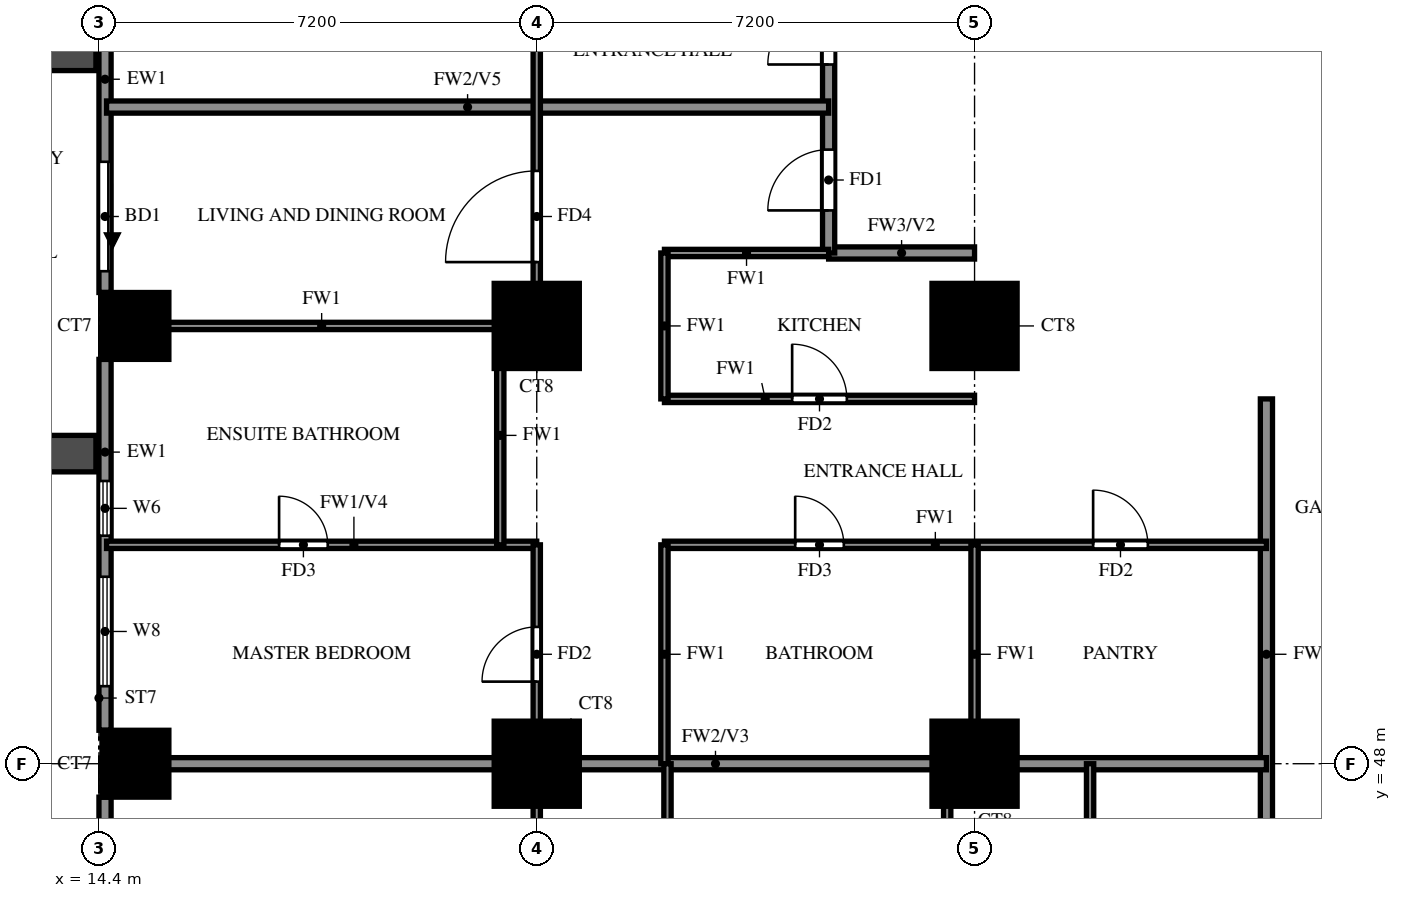
"""IFC4 building model, lengths in metres.
Left out: names, types, materials, properties, quantities, classifications, styles, units other than length and angle.
Written with IfcOpenShell. Run it as: python <this file> out.ifc"""

import sys

from ifc_helpers import new_model, si_unit, direction, frame, frame_2d, origin, origin_2d, place, context, subcontext, project, spatial, rectangle, extrude, source, transform, mapped, element, fill, save


model = new_model("IFC4")
c1 = context("Model", 3, precision=1e-05, world=origin(), true_north=direction((0.0, 1.0)))
c2 = subcontext(c1, "Body", "Model", "MODEL_VIEW")
j1 = project(units=[si_unit("LENGTHUNIT", "METRE"), si_unit("PLANEANGLEUNIT", "RADIAN")], contexts=[c1])
p1 = place(None, origin())
s1 = spatial("IfcSite", under=j1, at=p1, CompositionType="ELEMENT")
p2 = place(p1, origin())
s2 = spatial("IfcBuilding", under=s1, at=p2, CompositionType="ELEMENT")
p3 = place(p2, frame((0.0, 0.0, 51.5)))
s3 = spatial("IfcBuildingStorey", under=s2, at=p3, CompositionType="ELEMENT", Elevation=51.5)
m1 = source(origin(), c2, "Body", "SweptSolid", [
    extrude(rectangle(XDim=1.1, YDim=1.1, at=origin_2d()), origin(), (0.0, 0.0, 1.0), 3.18),
])
p4 = place(p3, frame((15.0, 48.0, 0.0), z_axis=(0.0, 0.0, 1.0), x_axis=(1.0, 0.0, 0.0)))
e1 = element("IfcColumn", 1, at=p4, inside=s3, PredefinedType="COLUMN", context=c2, shape_type="MappedRepresentation", body=[
    mapped(m1, transform((0.0, 0.0, 0.0))),
])
m2 = source(origin(), c2, "Body", "SweptSolid", [
    extrude(rectangle(XDim=1.4, YDim=1.4, at=origin_2d()), origin(), (0.0, 0.0, 1.0), 3.18),
])
for number, where, z_axis, x_axis in (
    (2, (21.6, 48.0, 0.0), (0.0, 0.0, 1.0), (1.0, 0.0, 0.0)),
    (3, (28.8, 48.0, 0.0), (0.0, 0.0, 1.0), (1.0, 0.0, 0.0)),
):
    element("IfcColumn", number, at=place(p3, frame(where, z_axis=z_axis, x_axis=x_axis)), inside=s3, PredefinedType="COLUMN", context=c2, shape_type="MappedRepresentation", body=[
        mapped(m2, transform((0.0, 0.0, 0.0))),
    ])
p5 = place(p3, frame((15.0, 55.2, 0.0), z_axis=(0.0, 0.0, 1.0), x_axis=(1.0, 0.0, 0.0)))
e4 = element("IfcColumn", 4, at=p5, inside=s3, PredefinedType="COLUMN", context=c2, shape_type="MappedRepresentation", body=[
    mapped(m1, transform((0.0, 0.0, 0.0))),
])
for number, where, z_axis, x_axis in (
    (5, (21.6, 55.2, 0.0), (0.0, 0.0, 1.0), (1.0, 0.0, 0.0)),
    (6, (28.8, 55.2, 0.0), (0.0, 0.0, 1.0), (1.0, 0.0, 0.0)),
):
    element("IfcColumn", number, at=place(p3, frame(where, z_axis=z_axis, x_axis=x_axis)), inside=s3, PredefinedType="COLUMN", context=c2, shape_type="MappedRepresentation", body=[
        mapped(m2, transform((0.0, 0.0, 0.0))),
    ])
p6 = place(p3, frame((14.5, 61.85, 0.0), z_axis=(0.0, 0.0, 1.0), x_axis=(0.0, -1.0, 0.0)))
e7 = element("IfcWall", 7, at=p6, inside=s3, PredefinedType="SOLIDWALL", context=c2, shape_type="SweptSolid", body=[
    extrude(rectangle(XDim=6.1, YDim=0.2, at=frame_2d((3.05, 0.0))), origin(), (0.0, 0.0, 1.0), 3.18),
])
p7 = place(p6, frame((3.95, 0.0, 0.0)))
e8 = element("IfcOpeningElement", 8, at=p7, cuts=e7, PredefinedType="OPENING", context=c2, shape_type="SweptSolid", body=[
    extrude(rectangle(XDim=1.8, YDim=2.4, at=frame_2d((0.9, 1.2))), frame((0.0, 0.11, 0.0), z_axis=(0.0, -1.0, 0.0), x_axis=(1.0, 0.0, 0.0)), (0.0, 0.0, 1.0), 0.22),
])
p8 = place(p6, frame((0.425, 0.0, 0.6)))
e9 = element("IfcOpeningElement", 9, at=p8, cuts=e7, PredefinedType="OPENING", context=c2, shape_type="SweptSolid", body=[
    extrude(rectangle(XDim=1.2, YDim=2.4, at=frame_2d((0.6, 1.2))), frame((0.0, 0.11, 0.0), z_axis=(0.0, -1.0, 0.0), x_axis=(1.0, 0.0, 0.0)), (0.0, 0.0, 1.0), 0.22),
])
p9 = place(p3, frame((14.5, 54.65, 0.0), z_axis=(0.0, 0.0, 1.0), x_axis=(0.0, -1.0, 0.0)))
e10 = element("IfcWall", 10, at=p9, inside=s3, PredefinedType="SOLIDWALL", context=c2, shape_type="SweptSolid", body=[
    extrude(rectangle(XDim=6.1, YDim=0.2, at=frame_2d((3.05, 0.0))), origin(), (0.0, 0.0, 1.0), 3.18),
])
p10 = place(p9, frame((3.575, 0.0, 0.6)))
e11 = element("IfcOpeningElement", 11, at=p10, cuts=e10, PredefinedType="OPENING", context=c2, shape_type="SweptSolid", body=[
    extrude(rectangle(XDim=1.8, YDim=2.4, at=frame_2d((0.9, 1.2))), frame((0.0, 0.11, 0.0), z_axis=(0.0, -1.0, 0.0), x_axis=(1.0, 0.0, 0.0)), (0.0, 0.0, 1.0), 0.22),
])
p11 = place(p9, frame((2.0, 0.0, 1.5)))
e12 = element("IfcOpeningElement", 12, at=p11, cuts=e10, PredefinedType="OPENING", context=c2, shape_type="SweptSolid", body=[
    extrude(rectangle(XDim=0.9, YDim=0.9, at=frame_2d((0.45, 0.45))), frame((0.0, 0.11, 0.0), z_axis=(0.0, -1.0, 0.0), x_axis=(1.0, 0.0, 0.0)), (0.0, 0.0, 1.0), 0.22),
])
p12 = place(p3, frame((14.5, 47.45, 0.0), z_axis=(0.0, 0.0, 1.0), x_axis=(0.0, -1.0, 0.0)))
e13 = element("IfcWall", 13, at=p12, inside=s3, PredefinedType="SOLIDWALL", context=c2, shape_type="SweptSolid", body=[
    extrude(rectangle(XDim=6.1, YDim=0.2, at=frame_2d((3.05, 0.0))), origin(), (0.0, 0.0, 1.0), 3.18),
])
p13 = place(p12, frame((3.95, 0.0, 0.0)))
e14 = element("IfcOpeningElement", 14, at=p13, cuts=e13, PredefinedType="OPENING", context=c2, shape_type="SweptSolid", body=[
    extrude(rectangle(XDim=1.8, YDim=2.4, at=frame_2d((0.9, 1.2))), frame((0.0, 0.11, 0.0), z_axis=(0.0, -1.0, 0.0), x_axis=(1.0, 0.0, 0.0)), (0.0, 0.0, 1.0), 0.22),
])
p14 = place(p12, frame((0.425, 0.0, 0.6)))
e15 = element("IfcOpeningElement", 15, at=p14, cuts=e13, PredefinedType="OPENING", context=c2, shape_type="SweptSolid", body=[
    extrude(rectangle(XDim=1.2, YDim=2.4, at=frame_2d((0.6, 1.2))), frame((0.0, 0.11, 0.0), z_axis=(0.0, -1.0, 0.0), x_axis=(1.0, 0.0, 0.0)), (0.0, 0.0, 1.0), 0.22),
])
p15 = place(p12, frame((2.6, 0.0, 0.6)))
e16 = element("IfcOpeningElement", 16, at=p15, cuts=e13, PredefinedType="OPENING", context=c2, shape_type="SweptSolid", body=[
    extrude(rectangle(XDim=0.9, YDim=2.4, at=frame_2d((0.45, 1.2))), frame((0.0, 0.11, 0.0), z_axis=(0.0, -1.0, 0.0), x_axis=(1.0, 0.0, 0.0)), (0.0, 0.0, 1.0), 0.22),
])
for number, where, z_axis, x_axis in (
    (17, (14.35, 59.7, 0.0), (0.0, 0.0, 1.0), (-1.0, 0.0, 0.0)),
    (18, (14.35, 53.1, 0.0), (0.0, 0.0, 1.0), (-1.0, 0.0, 0.0)),
):
    element("IfcWall", number, at=place(p3, frame(where, z_axis=z_axis, x_axis=x_axis)), inside=s3, PredefinedType="SOLIDWALL", context=c2, shape_type="SweptSolid", body=[
        extrude(rectangle(XDim=2.65, YDim=0.6, at=frame_2d((1.325, 0.0))), origin(), (0.0, 0.0, 1.0), 2.85),
    ])
p16 = place(p3, frame((26.4, 56.4, 0.0), z_axis=(0.0, 0.0, 1.0), x_axis=(1.0, 0.0, 0.0)))
e19 = element("IfcWall", 19, at=p16, inside=s3, PredefinedType="SOLIDWALL", context=c2, shape_type="SweptSolid", body=[
    extrude(rectangle(XDim=2.4, YDim=0.2, at=frame_2d((1.2, 0.0))), origin(), (0.0, 0.0, 1.0), 3.18),
])
p17 = place(p3, frame((26.4, 56.4, 0.0), z_axis=(0.0, 0.0, 1.0), x_axis=(0.0, 1.0, 0.0)))
e20 = element("IfcWall", 20, at=p17, inside=s3, PredefinedType="SOLIDWALL", context=c2, shape_type="SweptSolid", body=[
    extrude(rectangle(XDim=9.6, YDim=0.2, at=frame_2d((4.8, 0.0))), origin(), (0.0, 0.0, 1.0), 3.18),
])
p18 = place(p17, frame((0.7, 0.0, 0.0)))
e21 = element("IfcOpeningElement", 21, at=p18, cuts=e20, PredefinedType="OPENING", context=c2, shape_type="SweptSolid", body=[
    extrude(rectangle(XDim=1.0, YDim=2.1, at=frame_2d((0.5, 1.05))), frame((0.0, 0.11, 0.0), z_axis=(0.0, -1.0, 0.0), x_axis=(1.0, 0.0, 0.0)), (0.0, 0.0, 1.0), 0.22),
])
p19 = place(p17, frame((3.1, 0.0, 0.0)))
e22 = element("IfcOpeningElement", 22, at=p19, cuts=e20, PredefinedType="OPENING", context=c2, shape_type="SweptSolid", body=[
    extrude(rectangle(XDim=1.0, YDim=2.1, at=frame_2d((0.5, 1.05))), frame((0.0, 0.11, 0.0), z_axis=(0.0, -1.0, 0.0), x_axis=(1.0, 0.0, 0.0)), (0.0, 0.0, 1.0), 0.22),
])
p20 = place(p3, frame((33.6, 45.6, 0.0), z_axis=(0.0, 0.0, 1.0), x_axis=(0.0, 1.0, 0.0)))
e23 = element("IfcWall", 23, at=p20, inside=s3, PredefinedType="SOLIDWALL", context=c2, shape_type="SweptSolid", body=[
    extrude(rectangle(XDim=8.4, YDim=0.2, at=frame_2d((4.2, 0.0))), origin(), (0.0, 0.0, 1.0), 3.18),
])
p21 = place(p3, frame((14.525, 48.0, 0.0), z_axis=(0.0, 0.0, 1.0), x_axis=(1.0, 0.0, 0.0)))
e24 = element("IfcWall", 24, at=p21, inside=s3, PredefinedType="SOLIDWALL", context=c2, shape_type="SweptSolid", body=[
    extrude(rectangle(XDim=19.075, YDim=0.2, at=frame_2d((9.538, 0.0))), origin(), (0.0, 0.0, 1.0), 3.18),
])
p22 = place(p3, frame((14.525, 58.8, 0.0), z_axis=(0.0, 0.0, 1.0), x_axis=(1.0, 0.0, 0.0)))
e25 = element("IfcWall", 25, at=p22, inside=s3, PredefinedType="SOLIDWALL", context=c2, shape_type="SweptSolid", body=[
    extrude(rectangle(XDim=11.875, YDim=0.2, at=frame_2d((5.938, 0.0))), origin(), (0.0, 0.0, 1.0), 2.28),
])
p23 = place(p3, frame((14.525, 51.6, 0.0), z_axis=(0.0, 0.0, 1.0), x_axis=(1.0, 0.0, 0.0)))
e26 = element("IfcWall", 26, at=p23, inside=s3, PredefinedType="PARTITIONING", context=c2, shape_type="SweptSolid", body=[
    extrude(rectangle(XDim=7.075, YDim=0.12, at=frame_2d((3.538, 0.0))), origin(), (0.0, 0.0, 1.0), 2.28),
])
p24 = place(p23, frame((2.837, 0.0, 0.0)))
e27 = element("IfcOpeningElement", 27, at=p24, cuts=e26, PredefinedType="OPENING", context=c2, shape_type="SweptSolid", body=[
    extrude(rectangle(XDim=0.8, YDim=2.1, at=frame_2d((0.4, 1.05))), frame((0.0, 0.07, 0.0), z_axis=(0.0, -1.0, 0.0), x_axis=(1.0, 0.0, 0.0)), (0.0, 0.0, 1.0), 0.14),
])
p25 = place(p3, frame((23.7, 51.6, 0.0), z_axis=(0.0, 0.0, 1.0), x_axis=(1.0, 0.0, 0.0)))
e28 = element("IfcWall", 28, at=p25, inside=s3, PredefinedType="PARTITIONING", context=c2, shape_type="SweptSolid", body=[
    extrude(rectangle(XDim=9.9, YDim=0.12, at=frame_2d((4.95, 0.0))), origin(), (0.0, 0.0, 1.0), 3.18),
])
p26 = place(p25, frame((2.15, 0.0, 0.0)))
e29 = element("IfcOpeningElement", 29, at=p26, cuts=e28, PredefinedType="OPENING", context=c2, shape_type="SweptSolid", body=[
    extrude(rectangle(XDim=0.8, YDim=2.1, at=frame_2d((0.4, 1.05))), frame((0.0, 0.07, 0.0), z_axis=(0.0, -1.0, 0.0), x_axis=(1.0, 0.0, 0.0)), (0.0, 0.0, 1.0), 0.14),
])
p27 = place(p25, frame((7.05, 0.0, 0.0)))
e30 = element("IfcOpeningElement", 30, at=p27, cuts=e28, PredefinedType="OPENING", context=c2, shape_type="SweptSolid", body=[
    extrude(rectangle(XDim=0.9, YDim=2.1, at=frame_2d((0.45, 1.05))), frame((0.0, 0.07, 0.0), z_axis=(0.0, -1.0, 0.0), x_axis=(1.0, 0.0, 0.0)), (0.0, 0.0, 1.0), 0.14),
])
p28 = place(p3, frame((23.7, 54.0, 0.0), z_axis=(0.0, 0.0, 1.0), x_axis=(1.0, 0.0, 0.0)))
e31 = element("IfcWall", 31, at=p28, inside=s3, PredefinedType="PARTITIONING", context=c2, shape_type="SweptSolid", body=[
    extrude(rectangle(XDim=5.1, YDim=0.12, at=frame_2d((2.55, 0.0))), origin(), (0.0, 0.0, 1.0), 3.18),
])
p29 = place(p28, frame((2.1, 0.0, 0.0)))
e32 = element("IfcOpeningElement", 32, at=p29, cuts=e31, PredefinedType="OPENING", context=c2, shape_type="SweptSolid", body=[
    extrude(rectangle(XDim=0.9, YDim=2.1, at=frame_2d((0.45, 1.05))), frame((0.0, 0.07, 0.0), z_axis=(0.0, -1.0, 0.0), x_axis=(1.0, 0.0, 0.0)), (0.0, 0.0, 1.0), 0.14),
])
p30 = place(p3, frame((14.525, 55.2, 0.0), z_axis=(0.0, 0.0, 1.0), x_axis=(1.0, 0.0, 0.0)))
e33 = element("IfcWall", 33, at=p30, inside=s3, PredefinedType="PARTITIONING", context=c2, shape_type="SweptSolid", body=[
    extrude(rectangle(XDim=7.075, YDim=0.12, at=frame_2d((3.538, 0.0))), origin(), (0.0, 0.0, 1.0), 3.18),
])
p31 = place(p3, frame((23.7, 56.4, 0.0), z_axis=(0.0, 0.0, 1.0), x_axis=(1.0, 0.0, 0.0)))
e34 = element("IfcWall", 34, at=p31, inside=s3, PredefinedType="PARTITIONING", context=c2, shape_type="SweptSolid", body=[
    extrude(rectangle(XDim=2.7, YDim=0.12, at=frame_2d((1.35, 0.0))), origin(), (0.0, 0.0, 1.0), 3.18),
])
p32 = place(p3, frame((21.0, 51.6, 0.0), z_axis=(0.0, 0.0, 1.0), x_axis=(0.0, 1.0, 0.0)))
e35 = element("IfcWall", 35, at=p32, inside=s3, PredefinedType="PARTITIONING", context=c2, shape_type="SweptSolid", body=[
    extrude(rectangle(XDim=3.6, YDim=0.12, at=frame_2d((1.8, 0.0))), origin(), (0.0, 0.0, 1.0), 3.18),
])
p33 = place(p3, frame((21.6, 33.725, 0.0), z_axis=(0.0, 0.0, 1.0), x_axis=(0.0, 1.0, 0.0)))
e36 = element("IfcWall", 36, at=p33, inside=s3, PredefinedType="PARTITIONING", context=c2, shape_type="SweptSolid", body=[
    extrude(rectangle(XDim=17.875, YDim=0.12, at=frame_2d((8.938, 0.0))), origin(), (0.0, 0.0, 1.0), 3.18),
])
p34 = place(p33, frame((7.775, 0.0, 0.0)))
e37 = element("IfcOpeningElement", 37, at=p34, cuts=e36, PredefinedType="OPENING", context=c2, shape_type="SweptSolid", body=[
    extrude(rectangle(XDim=0.9, YDim=2.1, at=frame_2d((0.45, 1.05))), frame((0.0, 0.07, 0.0), z_axis=(0.0, -1.0, 0.0), x_axis=(1.0, 0.0, 0.0)), (0.0, 0.0, 1.0), 0.14),
])
p35 = place(p33, frame((15.625, 0.0, 0.0)))
e38 = element("IfcOpeningElement", 38, at=p35, cuts=e36, PredefinedType="OPENING", context=c2, shape_type="SweptSolid", body=[
    extrude(rectangle(XDim=0.9, YDim=2.1, at=frame_2d((0.45, 1.05))), frame((0.0, 0.07, 0.0), z_axis=(0.0, -1.0, 0.0), x_axis=(1.0, 0.0, 0.0)), (0.0, 0.0, 1.0), 0.14),
])
p36 = place(p3, frame((21.6, 55.2, 0.0), z_axis=(0.0, 0.0, 1.0), x_axis=(0.0, 1.0, 0.0)))
e39 = element("IfcWall", 39, at=p36, inside=s3, PredefinedType="PARTITIONING", context=c2, shape_type="SweptSolid", body=[
    extrude(rectangle(XDim=14.4, YDim=0.12, at=frame_2d((7.2, 0.0))), origin(), (0.0, 0.0, 1.0), 3.18),
])
p37 = place(p36, frame((1.05, 0.0, 0.0)))
e40 = element("IfcOpeningElement", 40, at=p37, cuts=e39, PredefinedType="OPENING", context=c2, shape_type="SweptSolid", body=[
    extrude(rectangle(XDim=1.5, YDim=2.1, at=frame_2d((0.75, 1.05))), frame((0.0, 0.07, 0.0), z_axis=(0.0, -1.0, 0.0), x_axis=(1.0, 0.0, 0.0)), (0.0, 0.0, 1.0), 0.14),
])
p38 = place(p36, frame((4.95, 0.0, 0.0)))
e41 = element("IfcOpeningElement", 41, at=p38, cuts=e39, PredefinedType="OPENING", context=c2, shape_type="SweptSolid", body=[
    extrude(rectangle(XDim=0.9, YDim=2.1, at=frame_2d((0.45, 1.05))), frame((0.0, 0.07, 0.0), z_axis=(0.0, -1.0, 0.0), x_axis=(1.0, 0.0, 0.0)), (0.0, 0.0, 1.0), 0.14),
])
p39 = place(p36, frame((10.35, 0.0, 0.0)))
e42 = element("IfcOpeningElement", 42, at=p39, cuts=e39, PredefinedType="OPENING", context=c2, shape_type="SweptSolid", body=[
    extrude(rectangle(XDim=0.9, YDim=2.1, at=frame_2d((0.45, 1.05))), frame((0.0, 0.07, 0.0), z_axis=(0.0, -1.0, 0.0), x_axis=(1.0, 0.0, 0.0)), (0.0, 0.0, 1.0), 0.14),
])
p40 = place(p3, frame((23.7, 48.0, 0.0), z_axis=(0.0, 0.0, 1.0), x_axis=(0.0, 1.0, 0.0)))
e43 = element("IfcWall", 43, at=p40, inside=s3, PredefinedType="PARTITIONING", context=c2, shape_type="SweptSolid", body=[
    extrude(rectangle(XDim=3.6, YDim=0.12, at=frame_2d((1.8, 0.0))), origin(), (0.0, 0.0, 1.0), 3.18),
])
p41 = place(p3, frame((23.7, 54.0, 0.0), z_axis=(0.0, 0.0, 1.0), x_axis=(0.0, 1.0, 0.0)))
e44 = element("IfcWall", 44, at=p41, inside=s3, PredefinedType="PARTITIONING", context=c2, shape_type="SweptSolid", body=[
    extrude(rectangle(XDim=2.4, YDim=0.12, at=frame_2d((1.2, 0.0))), origin(), (0.0, 0.0, 1.0), 3.18),
])
for number, where, z_axis, x_axis in (
    (45, (23.75, 42.9, 0.0), (0.0, 0.0, 1.0), (0.0, 1.0, 0.0)),
    (46, (28.35, 42.9, 0.0), (0.0, 0.0, 1.0), (0.0, 1.0, 0.0)),
):
    element("IfcWall", number, at=place(p3, frame(where, z_axis=z_axis, x_axis=x_axis)), inside=s3, PredefinedType="PARTITIONING", context=c2, shape_type="SweptSolid", body=[
        extrude(rectangle(XDim=5.1, YDim=0.12, at=frame_2d((2.55, 0.0))), origin(), (0.0, 0.0, 1.0), 3.18),
    ])
p42 = place(p3, frame((28.8, 48.0, 0.0), z_axis=(0.0, 0.0, 1.0), x_axis=(0.0, 1.0, 0.0)))
e47 = element("IfcWall", 47, at=p42, inside=s3, PredefinedType="PARTITIONING", context=c2, shape_type="SweptSolid", body=[
    extrude(rectangle(XDim=3.6, YDim=0.12, at=frame_2d((1.8, 0.0))), origin(), (0.0, 0.0, 1.0), 3.18),
])
p43 = place(p3, frame((30.7, 42.9, 0.0), z_axis=(0.0, 0.0, 1.0), x_axis=(0.0, 1.0, 0.0)))
e48 = element("IfcWall", 48, at=p43, inside=s3, PredefinedType="PARTITIONING", context=c2, shape_type="SweptSolid", body=[
    extrude(rectangle(XDim=5.1, YDim=0.12, at=frame_2d((2.55, 0.0))), origin(), (0.0, 0.0, 1.0), 3.18),
])
p44 = place(p7, origin())
e49 = element("IfcDoor", 49, at=p44, inside=s3, OperationType="DOUBLE_DOOR_SLIDING", PredefinedType="DOOR", context=c2, shape_type="SweptSolid", body=[
    extrude(rectangle(XDim=1.8, YDim=2.4, at=frame_2d((0.9, 1.2))), frame((0.0, 0.025, 0.0), z_axis=(0.0, -1.0, 0.0), x_axis=(1.0, 0.0, 0.0)), (0.0, 0.0, 1.0), 0.05),
])
fill(e8, e49)
p45 = place(p10, origin())
e50 = element("IfcWindow", 50, at=p45, inside=s3, PartitioningType="DOUBLE_PANEL_VERTICAL", PredefinedType="WINDOW", context=c2, shape_type="SweptSolid", body=[
    extrude(rectangle(XDim=1.8, YDim=2.4, at=frame_2d((0.9, 1.2))), frame((0.0, 0.03, 0.0), z_axis=(0.0, -1.0, 0.0), x_axis=(1.0, 0.0, 0.0)), (0.0, 0.0, 1.0), 0.06),
])
fill(e11, e50)
p46 = place(p11, origin())
e51 = element("IfcWindow", 51, at=p46, inside=s3, PartitioningType="SINGLE_PANEL", PredefinedType="WINDOW", context=c2, shape_type="SweptSolid", body=[
    extrude(rectangle(XDim=0.9, YDim=0.9, at=frame_2d((0.45, 0.45))), frame((0.0, 0.03, 0.0), z_axis=(0.0, -1.0, 0.0), x_axis=(1.0, 0.0, 0.0)), (0.0, 0.0, 1.0), 0.06),
])
fill(e12, e51)
p47 = place(p18, origin())
e52 = element("IfcDoor", 52, at=p47, inside=s3, OperationType="SINGLE_SWING_LEFT", PredefinedType="DOOR", context=c2, shape_type="SweptSolid", body=[
    extrude(rectangle(XDim=1.0, YDim=2.1, at=frame_2d((0.5, 1.05))), frame((0.0, 0.025, 0.0), z_axis=(0.0, -1.0, 0.0), x_axis=(1.0, 0.0, 0.0)), (0.0, 0.0, 1.0), 0.05),
])
fill(e21, e52)
p48 = place(p35, origin())
e53 = element("IfcDoor", 53, at=p48, inside=s3, OperationType="SINGLE_SWING_LEFT", PredefinedType="DOOR", context=c2, shape_type="SweptSolid", body=[
    extrude(rectangle(XDim=0.9, YDim=2.1, at=frame_2d((0.45, 1.05))), frame((0.0, 0.025, 0.0), z_axis=(0.0, -1.0, 0.0), x_axis=(1.0, 0.0, 0.0)), (0.0, 0.0, 1.0), 0.05),
])
fill(e38, e53)
p49 = place(p24, origin())
e54 = element("IfcDoor", 54, at=p49, inside=s3, OperationType="SINGLE_SWING_RIGHT", PredefinedType="DOOR", context=c2, shape_type="SweptSolid", body=[
    extrude(rectangle(XDim=0.8, YDim=2.1, at=frame_2d((0.4, 1.05))), frame((0.0, 0.025, 0.0), z_axis=(0.0, -1.0, 0.0), x_axis=(1.0, 0.0, 0.0)), (0.0, 0.0, 1.0), 0.05),
])
fill(e27, e54)
p50 = place(p37, origin())
e55 = element("IfcDoor", 55, at=p50, inside=s3, OperationType="SINGLE_SWING_LEFT", PredefinedType="DOOR", context=c2, shape_type="SweptSolid", body=[
    extrude(rectangle(XDim=1.5, YDim=2.1, at=frame_2d((0.75, 1.05))), frame((0.0, 0.025, 0.0), z_axis=(0.0, -1.0, 0.0), x_axis=(1.0, 0.0, 0.0)), (0.0, 0.0, 1.0), 0.05),
])
fill(e40, e55)
p51 = place(p26, origin())
e56 = element("IfcDoor", 56, at=p51, inside=s3, OperationType="SINGLE_SWING_LEFT", PredefinedType="DOOR", context=c2, shape_type="SweptSolid", body=[
    extrude(rectangle(XDim=0.8, YDim=2.1, at=frame_2d((0.4, 1.05))), frame((0.0, 0.025, 0.0), z_axis=(0.0, -1.0, 0.0), x_axis=(1.0, 0.0, 0.0)), (0.0, 0.0, 1.0), 0.05),
])
fill(e29, e56)
p52 = place(p29, origin())
e57 = element("IfcDoor", 57, at=p52, inside=s3, OperationType="SINGLE_SWING_RIGHT", PredefinedType="DOOR", context=c2, shape_type="SweptSolid", body=[
    extrude(rectangle(XDim=0.9, YDim=2.1, at=frame_2d((0.45, 1.05))), frame((0.0, 0.025, 0.0), z_axis=(0.0, -1.0, 0.0), x_axis=(1.0, 0.0, 0.0)), (0.0, 0.0, 1.0), 0.05),
])
fill(e32, e57)
p53 = place(p27, origin())
e58 = element("IfcDoor", 58, at=p53, inside=s3, OperationType="SINGLE_SWING_LEFT", PredefinedType="DOOR", context=c2, shape_type="SweptSolid", body=[
    extrude(rectangle(XDim=0.9, YDim=2.1, at=frame_2d((0.45, 1.05))), frame((0.0, 0.025, 0.0), z_axis=(0.0, -1.0, 0.0), x_axis=(1.0, 0.0, 0.0)), (0.0, 0.0, 1.0), 0.05),
])
fill(e30, e58)
p54 = place(p19, origin())
e59 = element("IfcDoor", 59, at=p54, inside=s3, OperationType="SINGLE_SWING_RIGHT", PredefinedType="DOOR", context=c2, shape_type="SweptSolid", body=[
    extrude(rectangle(XDim=1.0, YDim=2.1, at=frame_2d((0.5, 1.05))), frame((0.0, 0.025, 0.0), z_axis=(0.0, -1.0, 0.0), x_axis=(1.0, 0.0, 0.0)), (0.0, 0.0, 1.0), 0.05),
])
fill(e22, e59)
save(model, sys.argv[1])
